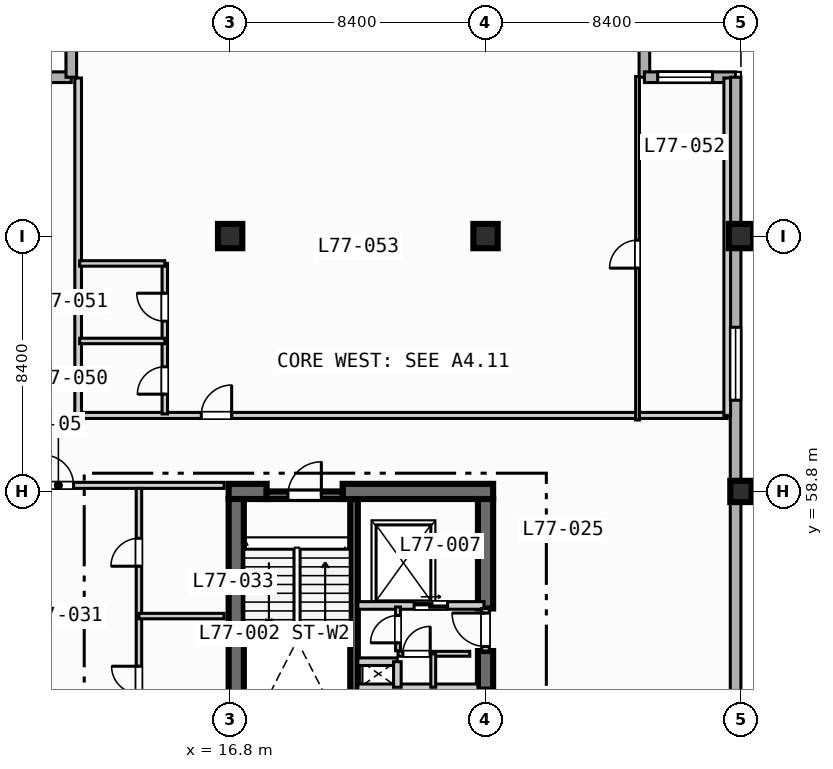
"""IFC4 building model, lengths in metres.
Left out: names, types, materials, properties, quantities, classifications, styles, units other than length and angle.
Written with IfcOpenShell. Run it as: python <this file> out.ifc"""

import sys

from ifc_helpers import new_model, si_unit, direction, frame, frame_2d, origin, origin_2d, place, context, subcontext, project, spatial, rectangle, extrude, element, fill, save


model = new_model("IFC4")
c1 = context("Model", 3, precision=1e-05, world=origin(), true_north=direction((0.0, 1.0)))
c2 = subcontext(c1, "Body", "Model", "MODEL_VIEW")
j1 = project(units=[si_unit("LENGTHUNIT", "METRE"), si_unit("PLANEANGLEUNIT", "RADIAN")], contexts=[c1])
p1 = place(None, origin())
s1 = spatial("IfcSite", under=j1, at=p1, CompositionType="ELEMENT")
p2 = place(p1, origin())
s2 = spatial("IfcBuilding", under=s1, at=p2, CompositionType="ELEMENT")
p3 = place(p2, frame((0.0, 0.0, 312.5)))
s3 = spatial("IfcBuildingStorey", under=s2, at=p3, CompositionType="ELEMENT", Elevation=312.5)
p4 = place(p3, frame((20.875, 50.5, 0.0), z_axis=(0.0, 0.0, 1.0), x_axis=(0.0, 1.0, 0.0)))
e1 = element("IfcWall", 1, at=p4, inside=s3, PredefinedType="SOLIDWALL", context=c2, shape_type="SweptSolid", body=[
    extrude(rectangle(XDim=8.05, YDim=0.25, at=frame_2d((4.025, 0.0))), origin(), (0.0, 0.0, 1.0), 3.67),
])
p5 = place(p3, frame((16.75, 58.8, 0.0), z_axis=(0.0, 0.0, 1.0), x_axis=(1.0, 0.0, 0.0)))
e2 = element("IfcWall", 2, at=p5, inside=s3, PredefinedType="SHEAR", context=c2, shape_type="SweptSolid", body=[
    extrude(rectangle(XDim=1.25, YDim=0.5, at=frame_2d((0.625, 0.0))), origin(), (0.0, 0.0, 1.0), 3.67),
])
p6 = place(p3, frame((20.5, 58.8, 0.0), z_axis=(0.0, 0.0, 1.0), x_axis=(1.0, 0.0, 0.0)))
e3 = element("IfcWall", 3, at=p6, inside=s3, PredefinedType="SHEAR", context=c2, shape_type="SweptSolid", body=[
    extrude(rectangle(XDim=4.95, YDim=0.5, at=frame_2d((2.475, 0.0))), origin(), (0.0, 0.0, 1.0), 3.67),
])
p7 = place(p3, frame((17.0, 42.2, 0.0), z_axis=(0.0, 0.0, 1.0), x_axis=(0.0, 1.0, 0.0)))
e4 = element("IfcWall", 4, at=p7, inside=s3, PredefinedType="SHEAR", context=c2, shape_type="SweptSolid", body=[
    extrude(rectangle(XDim=16.35, YDim=0.5, at=frame_2d((8.175, 0.0))), origin(), (0.0, 0.0, 1.0), 3.67),
])
p8 = place(p3, frame((25.2, 52.28, 0.0), z_axis=(0.0, 0.0, 1.0), x_axis=(0.0, 1.0, 0.0)))
e5 = element("IfcWall", 5, at=p8, inside=s3, PredefinedType="SHEAR", context=c2, shape_type="SweptSolid", body=[
    extrude(rectangle(XDim=1.27, YDim=0.5, at=frame_2d((0.635, 0.0))), origin(), (0.0, 0.0, 1.0), 3.67),
])
p9 = place(p3, frame((25.2, 54.95, 0.0), z_axis=(0.0, 0.0, 1.0), x_axis=(0.0, 1.0, 0.0)))
e6 = element("IfcWall", 6, at=p9, inside=s3, PredefinedType="SHEAR", context=c2, shape_type="SweptSolid", body=[
    extrude(rectangle(XDim=3.6, YDim=0.5, at=frame_2d((1.8, 0.0))), origin(), (0.0, 0.0, 1.0), 3.67),
])
for number, where, z_axis, x_axis in (
    (7, (16.8, 67.2, 0.0), (0.0, 0.0, 1.0), (1.0, 0.0, 0.0)),
    (8, (25.2, 67.2, 0.0), (0.0, 0.0, 1.0), (1.0, 0.0, 0.0)),
):
    element("IfcColumn", number, at=place(p3, frame(where, z_axis=z_axis, x_axis=x_axis)), inside=s3, PredefinedType="COLUMN", context=c2, shape_type="SweptSolid", body=[
        extrude(rectangle(XDim=0.8, YDim=0.8, at=origin_2d()), origin(), (0.0, 0.0, 1.0), 3.9),
    ])
p10 = place(p3, frame((33.6, 58.8, 0.0), z_axis=(0.0, 0.0, 1.0), x_axis=(1.0, 0.0, 0.0)))
e9 = element("IfcColumn", 9, at=p10, inside=s3, PredefinedType="COLUMN", context=c2, shape_type="SweptSolid", body=[
    extrude(rectangle(XDim=0.7, YDim=0.7, at=origin_2d()), origin(), (0.0, 0.0, 1.0), 3.9),
])
p11 = place(p3, frame((33.6, 67.2, 0.0), z_axis=(0.0, 0.0, 1.0), x_axis=(1.0, 0.0, 0.0)))
e10 = element("IfcColumn", 10, at=p11, inside=s3, PredefinedType="COLUMN", context=c2, shape_type="SweptSolid", body=[
    extrude(rectangle(XDim=0.8, YDim=0.8, at=origin_2d()), origin(), (0.0, 0.0, 1.0), 3.9),
])
for number, where, z_axis, x_axis in (
    (11, (8.575, 72.425, 0.0), (0.0, 0.0, 1.0), (1.0, 0.0, 0.0)),
    (12, (11.575, 72.425, 0.0), (0.0, 0.0, 1.0), (0.0, 1.0, 0.0)),
    (13, (30.425, 75.425, 0.0), (0.0, 0.0, 1.0), (0.0, -1.0, 0.0)),
):
    element("IfcWall", number, at=place(p3, frame(where, z_axis=z_axis, x_axis=x_axis)), inside=s3, PredefinedType="STANDARD", context=c2, shape_type="SweptSolid", body=[
        extrude(rectangle(XDim=3.0, YDim=0.35, at=frame_2d((1.5, 0.0))), origin(), (0.0, 0.0, 1.0), 3.67),
    ])
p12 = place(p3, frame((30.425, 72.425, 0.0), z_axis=(0.0, 0.0, 1.0), x_axis=(1.0, 0.0, 0.0)))
e14 = element("IfcWall", 14, at=p12, inside=s3, PredefinedType="STANDARD", context=c2, shape_type="SweptSolid", body=[
    extrude(rectangle(XDim=3.0, YDim=0.35, at=frame_2d((1.5, 0.0))), origin(), (0.0, 0.0, 1.0), 3.67),
])
p13 = place(p12, frame((0.438, 0.0, 0.85)))
e15 = element("IfcOpeningElement", 15, at=p13, cuts=e14, PredefinedType="OPENING", context=c2, shape_type="SweptSolid", body=[
    extrude(rectangle(XDim=1.8, YDim=1.8, at=frame_2d((0.9, 0.9))), frame((0.0, 0.185, 0.0), z_axis=(0.0, -1.0, 0.0), x_axis=(1.0, 0.0, 0.0)), (0.0, 0.0, 1.0), 0.37),
])
p14 = place(p3, frame((33.425, 72.425, 0.0), z_axis=(0.0, 0.0, 1.0), x_axis=(0.0, -1.0, 0.0)))
e16 = element("IfcWall", 16, at=p14, inside=s3, PredefinedType="STANDARD", context=c2, shape_type="SweptSolid", body=[
    extrude(rectangle(XDim=39.0, YDim=0.35, at=frame_2d((19.5, 0.0))), origin(), (0.0, 0.0, 1.0), 3.67),
])
p15 = place(p14, frame((33.725, 0.0, 0.85)))
e17 = element("IfcOpeningElement", 17, at=p15, cuts=e16, PredefinedType="OPENING", context=c2, shape_type="SweptSolid", body=[
    extrude(rectangle(XDim=1.8, YDim=1.8, at=frame_2d((0.9, 0.9))), frame((0.0, 0.185, 0.0), z_axis=(0.0, -1.0, 0.0), x_axis=(1.0, 0.0, 0.0)), (0.0, 0.0, 1.0), 0.37),
])
p16 = place(p14, frame((8.225, 0.0, 0.85)))
e18 = element("IfcOpeningElement", 18, at=p16, cuts=e16, PredefinedType="OPENING", context=c2, shape_type="SweptSolid", body=[
    extrude(rectangle(XDim=2.4, YDim=1.95, at=frame_2d((1.2, 0.975))), frame((0.0, 0.185, 0.0), z_axis=(0.0, -1.0, 0.0), x_axis=(1.0, 0.0, 0.0)), (0.0, 0.0, 1.0), 0.37),
])
p17 = place(p3, frame((18.0, 58.675, 0.0), z_axis=(0.0, 0.0, 1.0), x_axis=(1.0, 0.0, 0.0)))
e19 = element("IfcWall", 19, at=p17, inside=s3, PredefinedType="SOLIDWALL", context=c2, shape_type="SweptSolid", body=[
    extrude(rectangle(XDim=2.5, YDim=0.25, at=frame_2d((1.25, 0.0))), origin(), (0.0, 0.0, 1.0), 3.67),
])
p18 = place(p17, frame((0.7, 0.0, 0.0)))
e20 = element("IfcOpeningElement", 20, at=p18, cuts=e19, PredefinedType="OPENING", context=c2, shape_type="SweptSolid", body=[
    extrude(rectangle(XDim=1.1, YDim=2.15, at=frame_2d((0.55, 1.075))), frame((0.0, 0.135, 0.0), z_axis=(0.0, -1.0, 0.0), x_axis=(1.0, 0.0, 0.0)), (0.0, 0.0, 1.0), 0.27),
])
p19 = place(p3, frame((21.0, 52.34, 0.0), z_axis=(0.0, 0.0, 1.0), x_axis=(1.0, 0.0, 0.0)))
e21 = element("IfcWall", 21, at=p19, inside=s3, PredefinedType="SOLIDWALL", context=c2, shape_type="SweptSolid", body=[
    extrude(rectangle(XDim=3.95, YDim=0.25, at=frame_2d((1.975, 0.0))), origin(), (0.0, 0.0, 1.0), 3.67),
])
p20 = place(p3, frame((21.0, 55.05, 0.0), z_axis=(0.0, 0.0, 1.0), x_axis=(1.0, 0.0, 0.0)))
e22 = element("IfcWall", 22, at=p20, inside=s3, PredefinedType="SOLIDWALL", context=c2, shape_type="SweptSolid", body=[
    extrude(rectangle(XDim=4.15, YDim=0.25, at=frame_2d((2.075, 0.0))), origin(), (0.0, 0.0, 1.0), 3.67),
])
p21 = place(p20, frame((1.85, 0.0, 0.0)))
e23 = element("IfcOpeningElement", 23, at=p21, cuts=e22, PredefinedType="OPENING", context=c2, shape_type="SweptSolid", body=[
    extrude(rectangle(XDim=1.1, YDim=2.15, at=frame_2d((0.55, 1.075))), frame((0.0, 0.135, 0.0), z_axis=(0.0, -1.0, 0.0), x_axis=(1.0, 0.0, 0.0)), (0.0, 0.0, 1.0), 0.27),
])
p22 = place(p3, frame((25.2, 53.55, 0.0), z_axis=(0.0, 0.0, 1.0), x_axis=(0.0, 1.0, 0.0)))
e24 = element("IfcWall", 24, at=p22, inside=s3, PredefinedType="SOLIDWALL", context=c2, shape_type="SweptSolid", body=[
    extrude(rectangle(XDim=1.4, YDim=0.25, at=frame_2d((0.7, 0.0))), origin(), (0.0, 0.0, 1.0), 3.67),
])
p23 = place(p22, frame((0.15, 0.0, 0.0)))
e25 = element("IfcOpeningElement", 25, at=p23, cuts=e24, PredefinedType="OPENING", context=c2, shape_type="SweptSolid", body=[
    extrude(rectangle(XDim=1.1, YDim=2.15, at=frame_2d((0.55, 1.075))), frame((0.0, 0.135, 0.0), z_axis=(0.0, -1.0, 0.0), x_axis=(1.0, 0.0, 0.0)), (0.0, 0.0, 1.0), 0.27),
])
p24 = place(p3, frame((21.0, 53.2, 0.0), z_axis=(0.0, 0.0, 1.0), x_axis=(1.0, 0.0, 0.0)))
e26 = element("IfcWall", 26, at=p24, inside=s3, PredefinedType="SOLIDWALL", context=c2, shape_type="SweptSolid", body=[
    extrude(rectangle(XDim=1.3, YDim=0.25, at=frame_2d((0.65, 0.0))), origin(), (0.0, 0.0, 1.0), 3.67),
])
p25 = place(p3, frame((22.3, 52.36, 0.0), z_axis=(0.0, 0.0, 1.0), x_axis=(0.0, 1.0, 0.0)))
e27 = element("IfcWall", 27, at=p25, inside=s3, PredefinedType="SOLIDWALL", context=c2, shape_type="SweptSolid", body=[
    extrude(rectangle(XDim=0.84, YDim=0.25, at=frame_2d((0.42, 0.0))), origin(), (0.0, 0.0, 1.0), 3.67),
])
p26 = place(p3, frame((22.32, 53.56, 0.0), z_axis=(0.0, 0.0, 1.0), x_axis=(0.0, 1.0, 0.0)))
e28 = element("IfcWall", 28, at=p26, inside=s3, PredefinedType="PARTITIONING", context=c2, shape_type="SweptSolid", body=[
    extrude(rectangle(XDim=1.44, YDim=0.16, at=frame_2d((0.72, 0.0))), origin(), (0.0, 0.0, 1.0), 3.67),
])
p27 = place(p26, frame((0.26, 0.0, 0.0)))
e29 = element("IfcOpeningElement", 29, at=p27, cuts=e28, PredefinedType="OPENING", context=c2, shape_type="SweptSolid", body=[
    extrude(rectangle(XDim=0.9, YDim=2.1, at=frame_2d((0.45, 1.05))), frame((0.0, 0.09, 0.0), z_axis=(0.0, -1.0, 0.0), x_axis=(1.0, 0.0, 0.0)), (0.0, 0.0, 1.0), 0.18),
])
p28 = place(p3, frame((22.32, 53.46, 0.0), z_axis=(0.0, 0.0, 1.0), x_axis=(1.0, 0.0, 0.0)))
e30 = element("IfcWall", 30, at=p28, inside=s3, PredefinedType="PARTITIONING", context=c2, shape_type="SweptSolid", body=[
    extrude(rectangle(XDim=2.36, YDim=0.16, at=frame_2d((1.18, 0.0))), origin(), (0.0, 0.0, 1.0), 3.67),
])
p29 = place(p28, frame((0.16, 0.0, 0.0)))
e31 = element("IfcOpeningElement", 31, at=p29, cuts=e30, PredefinedType="OPENING", context=c2, shape_type="SweptSolid", body=[
    extrude(rectangle(XDim=0.9, YDim=2.1, at=frame_2d((0.45, 1.05))), frame((0.0, 0.09, 0.0), z_axis=(0.0, -1.0, 0.0), x_axis=(1.0, 0.0, 0.0)), (0.0, 0.0, 1.0), 0.18),
])
p30 = place(p3, frame((23.48, 52.36, 0.0), z_axis=(0.0, 0.0, 1.0), x_axis=(0.0, 1.0, 0.0)))
e32 = element("IfcWall", 32, at=p30, inside=s3, PredefinedType="PARTITIONING", context=c2, shape_type="SweptSolid", body=[
    extrude(rectangle(XDim=1.1, YDim=0.16, at=frame_2d((0.55, 0.0))), origin(), (0.0, 0.0, 1.0), 3.67),
])
p31 = place(p3, frame((8.65, 59.0, 0.0), z_axis=(0.0, 0.0, 1.0), x_axis=(1.0, 0.0, 0.0)))
e33 = element("IfcWall", 33, at=p31, inside=s3, PredefinedType="PARTITIONING", context=c2, shape_type="SweptSolid", body=[
    extrude(rectangle(XDim=7.95, YDim=0.2, at=frame_2d((3.975, 0.0))), origin(), (0.0, 0.0, 1.0), 3.207),
])
p32 = place(p31, frame((2.0, 0.0, 0.0)))
e34 = element("IfcOpeningElement", 34, at=p32, cuts=e33, PredefinedType="OPENING", context=c2, shape_type="SweptSolid", body=[
    extrude(rectangle(XDim=1.0, YDim=2.15, at=frame_2d((0.5, 1.075))), frame((0.0, 0.11, 0.0), z_axis=(0.0, -1.0, 0.0), x_axis=(1.0, 0.0, 0.0)), (0.0, 0.0, 1.0), 0.22),
])
p33 = place(p3, frame((13.8, 50.5, 0.0), z_axis=(0.0, 0.0, 1.0), x_axis=(0.0, 1.0, 0.0)))
e35 = element("IfcWall", 35, at=p33, inside=s3, PredefinedType="PLUMBINGWALL", context=c2, shape_type="SweptSolid", body=[
    extrude(rectangle(XDim=8.4, YDim=0.18, at=frame_2d((4.2, 0.0))), origin(), (0.0, 0.0, 1.0), 3.67),
])
p34 = place(p33, frame((1.65, 0.0, 0.0)))
e36 = element("IfcOpeningElement", 36, at=p34, cuts=e35, PredefinedType="OPENING", context=c2, shape_type="SweptSolid", body=[
    extrude(rectangle(XDim=0.9, YDim=2.1, at=frame_2d((0.45, 1.05))), frame((0.0, 0.1, 0.0), z_axis=(0.0, -1.0, 0.0), x_axis=(1.0, 0.0, 0.0)), (0.0, 0.0, 1.0), 0.2),
])
p35 = place(p33, frame((5.84, 0.0, 0.0)))
e37 = element("IfcOpeningElement", 37, at=p35, cuts=e35, PredefinedType="OPENING", context=c2, shape_type="SweptSolid", body=[
    extrude(rectangle(XDim=0.92, YDim=2.1, at=frame_2d((0.46, 1.05))), frame((0.0, 0.1, 0.0), z_axis=(0.0, -1.0, 0.0), x_axis=(1.0, 0.0, 0.0)), (0.0, 0.0, 1.0), 0.2),
])
p36 = place(p3, frame((13.8, 54.7, 0.0), z_axis=(0.0, 0.0, 1.0), x_axis=(1.0, 0.0, 0.0)))
e38 = element("IfcWall", 38, at=p36, inside=s3, PredefinedType="PLUMBINGWALL", context=c2, shape_type="SweptSolid", body=[
    extrude(rectangle(XDim=2.8, YDim=0.18, at=frame_2d((1.4, 0.0))), origin(), (0.0, 0.0, 1.0), 3.67),
])
p37 = place(p3, frame((11.8, 61.3, 0.0), z_axis=(0.0, 0.0, 1.0), x_axis=(1.0, 0.0, 0.0)))
e39 = element("IfcWall", 39, at=p37, inside=s3, PredefinedType="PARTITIONING", context=c2, shape_type="SweptSolid", body=[
    extrude(rectangle(XDim=21.35, YDim=0.2, at=frame_2d((10.675, 0.0))), origin(), (0.0, 0.0, 1.0), 3.67),
])
p38 = place(p37, frame((4.05, 0.0, 0.0)))
e40 = element("IfcOpeningElement", 40, at=p38, cuts=e39, PredefinedType="OPENING", context=c2, shape_type="SweptSolid", body=[
    extrude(rectangle(XDim=1.0, YDim=2.15, at=frame_2d((0.5, 1.075))), frame((0.0, 0.11, 0.0), z_axis=(0.0, -1.0, 0.0), x_axis=(1.0, 0.0, 0.0)), (0.0, 0.0, 1.0), 0.22),
])
for number, where, z_axis, x_axis in (
    (41, (33.15, 61.3, 0.0), (0.0, 0.0, 1.0), (0.0, 1.0, 0.0)),
    (42, (11.8, 61.3, 0.0), (0.0, 0.0, 1.0), (0.0, 1.0, 0.0)),
):
    element("IfcWall", number, at=place(p3, frame(where, z_axis=z_axis, x_axis=x_axis)), inside=s3, PredefinedType="PARTITIONING", context=c2, shape_type="SweptSolid", body=[
        extrude(rectangle(XDim=11.1, YDim=0.22, at=frame_2d((5.55, 0.0))), origin(), (0.0, 0.0, 1.0), 3.67),
    ])
p39 = place(p3, frame((14.65, 61.35, 0.0), z_axis=(0.0, 0.0, 1.0), x_axis=(0.0, 1.0, 0.0)))
e43 = element("IfcWall", 43, at=p39, inside=s3, PredefinedType="PLUMBINGWALL", context=c2, shape_type="SweptSolid", body=[
    extrude(rectangle(XDim=4.95, YDim=0.18, at=frame_2d((2.475, 0.0))), origin(), (0.0, 0.0, 1.0), 3.67),
])
p40 = place(p39, frame((0.65, 0.0, 0.0)))
e44 = element("IfcOpeningElement", 44, at=p40, cuts=e43, PredefinedType="OPENING", context=c2, shape_type="SweptSolid", body=[
    extrude(rectangle(XDim=0.9, YDim=2.1, at=frame_2d((0.45, 1.05))), frame((0.0, 0.1, 0.0), z_axis=(0.0, -1.0, 0.0), x_axis=(1.0, 0.0, 0.0)), (0.0, 0.0, 1.0), 0.2),
])
p41 = place(p39, frame((3.05, 0.0, 0.0)))
e45 = element("IfcOpeningElement", 45, at=p41, cuts=e43, PredefinedType="OPENING", context=c2, shape_type="SweptSolid", body=[
    extrude(rectangle(XDim=0.92, YDim=2.1, at=frame_2d((0.46, 1.05))), frame((0.0, 0.1, 0.0), z_axis=(0.0, -1.0, 0.0), x_axis=(1.0, 0.0, 0.0)), (0.0, 0.0, 1.0), 0.2),
])
for number, where, z_axis, x_axis in (
    (46, (11.85, 63.75, 0.0), (0.0, 0.0, 1.0), (1.0, 0.0, 0.0)),
    (47, (11.85, 66.3, 0.0), (0.0, 0.0, 1.0), (1.0, 0.0, 0.0)),
):
    element("IfcWall", number, at=place(p3, frame(where, z_axis=z_axis, x_axis=x_axis)), inside=s3, PredefinedType="PLUMBINGWALL", context=c2, shape_type="SweptSolid", body=[
        extrude(rectangle(XDim=2.8, YDim=0.18, at=frame_2d((1.4, 0.0))), origin(), (0.0, 0.0, 1.0), 3.67),
    ])
p42 = place(p3, frame((30.2, 61.15, 0.0), z_axis=(0.0, 0.0, 1.0), x_axis=(0.0, 1.0, 0.0)))
e48 = element("IfcWall", 48, at=p42, inside=s3, PredefinedType="PARTITIONING", context=c2, shape_type="SweptSolid", body=[
    extrude(rectangle(XDim=11.3, YDim=0.125, at=frame_2d((5.65, 0.0))), origin(), (0.0, 0.0, 1.0), 3.67),
])
p43 = place(p42, frame((4.995, 0.0, 0.0)))
e49 = element("IfcOpeningElement", 49, at=p43, cuts=e48, PredefinedType="OPENING", context=c2, shape_type="SweptSolid", body=[
    extrude(rectangle(XDim=0.92, YDim=2.1, at=frame_2d((0.46, 1.05))), frame((0.0, 0.073, 0.0), z_axis=(0.0, -1.0, 0.0), x_axis=(1.0, 0.0, 0.0)), (0.0, 0.0, 1.0), 0.145),
])
p44 = place(p13, origin())
e50 = element("IfcWindow", 50, at=p44, inside=s3, PartitioningType="SINGLE_PANEL", PredefinedType="WINDOW", context=c2, shape_type="SweptSolid", body=[
    extrude(rectangle(XDim=1.8, YDim=1.8, at=frame_2d((0.9, 0.9))), frame((0.0, 0.03, 0.0), z_axis=(0.0, -1.0, 0.0), x_axis=(1.0, 0.0, 0.0)), (0.0, 0.0, 1.0), 0.06),
])
fill(e15, e50)
p45 = place(p16, origin())
e51 = element("IfcWindow", 51, at=p45, inside=s3, PartitioningType="SINGLE_PANEL", PredefinedType="WINDOW", context=c2, shape_type="SweptSolid", body=[
    extrude(rectangle(XDim=2.4, YDim=1.95, at=frame_2d((1.2, 0.975))), frame((0.0, 0.03, 0.0), z_axis=(0.0, -1.0, 0.0), x_axis=(1.0, 0.0, 0.0)), (0.0, 0.0, 1.0), 0.06),
])
fill(e18, e51)
p46 = place(p18, origin())
e52 = element("IfcDoor", 52, at=p46, inside=s3, OperationType="SINGLE_SWING_RIGHT", PredefinedType="DOOR", context=c2, shape_type="SweptSolid", body=[
    extrude(rectangle(XDim=1.1, YDim=2.15, at=frame_2d((0.55, 1.075))), frame((0.0, 0.025, 0.0), z_axis=(0.0, -1.0, 0.0), x_axis=(1.0, 0.0, 0.0)), (0.0, 0.0, 1.0), 0.05),
])
fill(e20, e52)
p47 = place(p21, origin())
e53 = element("IfcDoor", 53, at=p47, inside=s3, OperationType="SLIDING_TO_LEFT", PredefinedType="DOOR", context=c2, shape_type="SweptSolid", body=[
    extrude(rectangle(XDim=1.1, YDim=2.15, at=frame_2d((0.55, 1.075))), frame((0.0, 0.025, 0.0), z_axis=(0.0, -1.0, 0.0), x_axis=(1.0, 0.0, 0.0)), (0.0, 0.0, 1.0), 0.05),
])
fill(e23, e53)
p48 = place(p23, origin())
e54 = element("IfcDoor", 54, at=p48, inside=s3, OperationType="SINGLE_SWING_RIGHT", PredefinedType="DOOR", context=c2, shape_type="SweptSolid", body=[
    extrude(rectangle(XDim=1.1, YDim=2.15, at=frame_2d((0.55, 1.075))), frame((0.0, 0.025, 0.0), z_axis=(0.0, -1.0, 0.0), x_axis=(1.0, 0.0, 0.0)), (0.0, 0.0, 1.0), 0.05),
])
fill(e25, e54)
p49 = place(p27, origin())
e55 = element("IfcDoor", 55, at=p49, inside=s3, OperationType="SINGLE_SWING_LEFT", PredefinedType="DOOR", context=c2, shape_type="SweptSolid", body=[
    extrude(rectangle(XDim=0.9, YDim=2.1, at=frame_2d((0.45, 1.05))), frame((0.0, 0.025, 0.0), z_axis=(0.0, -1.0, 0.0), x_axis=(1.0, 0.0, 0.0)), (0.0, 0.0, 1.0), 0.05),
])
fill(e29, e55)
p50 = place(p29, origin())
e56 = element("IfcDoor", 56, at=p50, inside=s3, OperationType="SINGLE_SWING_RIGHT", PredefinedType="DOOR", context=c2, shape_type="SweptSolid", body=[
    extrude(rectangle(XDim=0.9, YDim=2.1, at=frame_2d((0.45, 1.05))), frame((0.0, 0.025, 0.0), z_axis=(0.0, -1.0, 0.0), x_axis=(1.0, 0.0, 0.0)), (0.0, 0.0, 1.0), 0.05),
])
fill(e31, e56)
p51 = place(p32, origin())
e57 = element("IfcDoor", 57, at=p51, inside=s3, OperationType="SINGLE_SWING_LEFT", PredefinedType="DOOR", context=c2, shape_type="SweptSolid", body=[
    extrude(rectangle(XDim=1.0, YDim=2.15, at=frame_2d((0.5, 1.075))), frame((0.0, 0.025, 0.0), z_axis=(0.0, -1.0, 0.0), x_axis=(1.0, 0.0, 0.0)), (0.0, 0.0, 1.0), 0.05),
])
fill(e34, e57)
p52 = place(p34, origin())
e58 = element("IfcDoor", 58, at=p52, inside=s3, OperationType="SINGLE_SWING_RIGHT", PredefinedType="DOOR", context=c2, shape_type="SweptSolid", body=[
    extrude(rectangle(XDim=0.9, YDim=2.1, at=frame_2d((0.45, 1.05))), frame((0.0, 0.025, 0.0), z_axis=(0.0, -1.0, 0.0), x_axis=(1.0, 0.0, 0.0)), (0.0, 0.0, 1.0), 0.05),
])
fill(e36, e58)
p53 = place(p35, origin())
e59 = element("IfcDoor", 59, at=p53, inside=s3, OperationType="SINGLE_SWING_LEFT", PredefinedType="DOOR", context=c2, shape_type="SweptSolid", body=[
    extrude(rectangle(XDim=0.92, YDim=2.1, at=frame_2d((0.46, 1.05))), frame((0.0, 0.025, 0.0), z_axis=(0.0, -1.0, 0.0), x_axis=(1.0, 0.0, 0.0)), (0.0, 0.0, 1.0), 0.05),
])
fill(e37, e59)
p54 = place(p38, origin())
e60 = element("IfcDoor", 60, at=p54, inside=s3, OperationType="SINGLE_SWING_RIGHT", PredefinedType="DOOR", context=c2, shape_type="SweptSolid", body=[
    extrude(rectangle(XDim=1.0, YDim=2.15, at=frame_2d((0.5, 1.075))), frame((0.0, 0.025, 0.0), z_axis=(0.0, -1.0, 0.0), x_axis=(1.0, 0.0, 0.0)), (0.0, 0.0, 1.0), 0.05),
])
fill(e40, e60)
p55 = place(p40, origin())
e61 = element("IfcDoor", 61, at=p55, inside=s3, OperationType="SINGLE_SWING_LEFT", PredefinedType="DOOR", context=c2, shape_type="SweptSolid", body=[
    extrude(rectangle(XDim=0.9, YDim=2.1, at=frame_2d((0.45, 1.05))), frame((0.0, 0.025, 0.0), z_axis=(0.0, -1.0, 0.0), x_axis=(1.0, 0.0, 0.0)), (0.0, 0.0, 1.0), 0.05),
])
fill(e44, e61)
p56 = place(p41, origin())
e62 = element("IfcDoor", 62, at=p56, inside=s3, OperationType="SINGLE_SWING_RIGHT", PredefinedType="DOOR", context=c2, shape_type="SweptSolid", body=[
    extrude(rectangle(XDim=0.92, YDim=2.1, at=frame_2d((0.46, 1.05))), frame((0.0, 0.025, 0.0), z_axis=(0.0, -1.0, 0.0), x_axis=(1.0, 0.0, 0.0)), (0.0, 0.0, 1.0), 0.05),
])
fill(e45, e62)
p57 = place(p43, origin())
e63 = element("IfcDoor", 63, at=p57, inside=s3, OperationType="SINGLE_SWING_LEFT", PredefinedType="DOOR", context=c2, shape_type="SweptSolid", body=[
    extrude(rectangle(XDim=0.92, YDim=2.1, at=frame_2d((0.46, 1.05))), frame((0.0, 0.025, 0.0), z_axis=(0.0, -1.0, 0.0), x_axis=(1.0, 0.0, 0.0)), (0.0, 0.0, 1.0), 0.05),
])
fill(e49, e63)
save(model, sys.argv[1])
